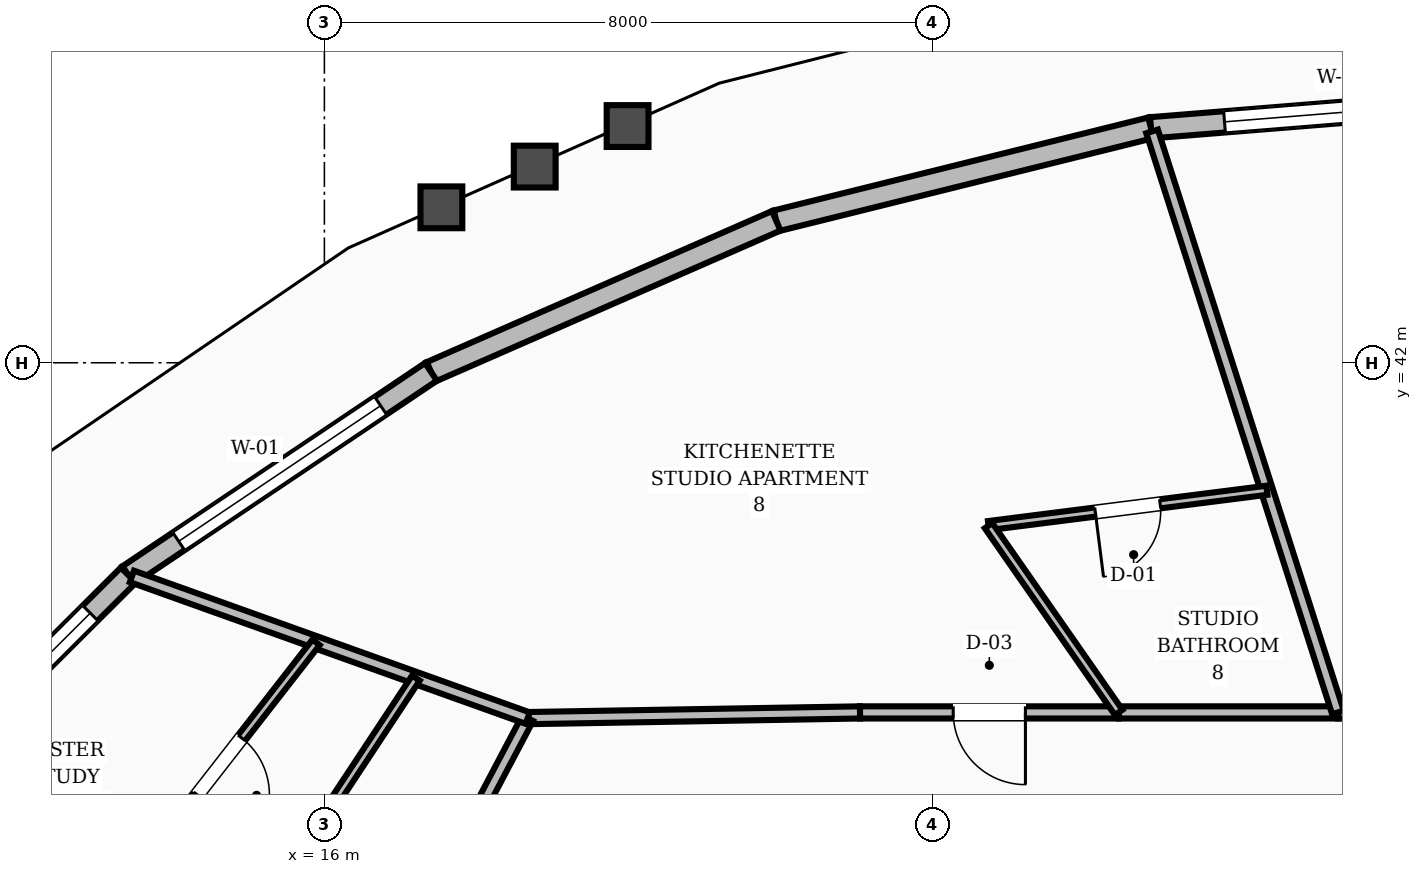
"""IFC4 building model, lengths in metres.
Left out: names, types, materials, properties, quantities, classifications, styles, units other than length and angle.
Written with IfcOpenShell. Run it as: python <this file> out.ifc"""

import sys

from ifc_helpers import new_model, si_unit, direction, frame, frame_2d, origin, place, context, subcontext, project, spatial, rectangle, extrude, element, fill, save


model = new_model("IFC4")
c1 = context("Model", 3, precision=1e-05, world=origin(), true_north=direction((0.0, 1.0)))
c2 = subcontext(c1, "Body", "Model", "MODEL_VIEW")
j1 = project(units=[si_unit("LENGTHUNIT", "METRE"), si_unit("PLANEANGLEUNIT", "RADIAN")], contexts=[c1])
p1 = place(None, origin())
s1 = spatial("IfcSite", under=j1, at=p1, CompositionType="ELEMENT")
p2 = place(p1, origin())
s2 = spatial("IfcBuilding", under=s1, at=p2, CompositionType="ELEMENT")
p3 = place(p2, frame((0.0, 0.0, 156.8)))
s3 = spatial("IfcBuildingStorey", under=s2, at=p3, CompositionType="ELEMENT", Elevation=156.8)
p4 = place(p3, frame((32.0, 45.504, 0.0), z_axis=(0.0, 0.0, 1.0), x_axis=(-0.996768616091, -0.080326371615, 0.0)))
e1 = element("IfcWall", 1, at=p4, inside=s3, PredefinedType="STANDARD", context=c2, shape_type="SweptSolid", body=[
    extrude(rectangle(XDim=5.143, YDim=0.28, at=frame_2d((2.571, 0.0))), origin(), (0.0, 0.0, 1.0), 2.82),
])
p5 = place(p4, frame((0.971, 0.0, 0.8)))
e2 = element("IfcOpeningElement", 2, at=p5, cuts=e1, PredefinedType="OPENING", context=c2, shape_type="SweptSolid", body=[
    extrude(rectangle(XDim=3.2, YDim=1.65, at=frame_2d((1.6, 0.825))), frame((0.0, 0.15, 0.0), z_axis=(0.0, -1.0, 0.0), x_axis=(1.0, 0.0, 0.0)), (0.0, 0.0, 1.0), 0.3),
])
p6 = place(p3, frame((26.874, 45.091, 0.0), z_axis=(0.0, 0.0, 1.0), x_axis=(-0.970528667517, -0.240985695689, 0.0)))
e3 = element("IfcWall", 3, at=p6, inside=s3, PredefinedType="STANDARD", context=c2, shape_type="SweptSolid", body=[
    extrude(rectangle(XDim=5.079, YDim=0.28, at=frame_2d((2.539, 0.0))), origin(), (0.0, 0.0, 1.0), 2.82),
])
p7 = place(p3, frame((21.945, 43.867, 0.0), z_axis=(0.0, 0.0, 1.0), x_axis=(-0.916185584373, -0.400754257603, 0.0)))
e4 = element("IfcWall", 4, at=p7, inside=s3, PredefinedType="STANDARD", context=c2, shape_type="SweptSolid", body=[
    extrude(rectangle(XDim=4.958, YDim=0.28, at=frame_2d((2.479, 0.0))), origin(), (0.0, 0.0, 1.0), 2.82),
])
p8 = place(p3, frame((17.402, 41.88, 0.0), z_axis=(0.0, 0.0, 1.0), x_axis=(-0.830095249601, -0.557621624931, 0.0)))
e5 = element("IfcWall", 5, at=p8, inside=s3, PredefinedType="STANDARD", context=c2, shape_type="SweptSolid", body=[
    extrude(rectangle(XDim=4.796, YDim=0.28, at=frame_2d((2.398, 0.0))), origin(), (0.0, 0.0, 1.0), 2.82),
])
p9 = place(p8, frame((0.798, 0.0, 0.8)))
e6 = element("IfcOpeningElement", 6, at=p9, cuts=e5, PredefinedType="OPENING", context=c2, shape_type="SweptSolid", body=[
    extrude(rectangle(XDim=3.2, YDim=1.65, at=frame_2d((1.6, 0.825))), frame((0.0, 0.15, 0.0), z_axis=(0.0, -1.0, 0.0), x_axis=(1.0, 0.0, 0.0)), (0.0, 0.0, 1.0), 0.3),
])
p10 = place(p3, frame((13.421, 39.206, 0.0), z_axis=(0.0, 0.0, 1.0), x_axis=(-0.708084852303, -0.706127355326, 0.0)))
e7 = element("IfcWall", 7, at=p10, inside=s3, PredefinedType="STANDARD", context=c2, shape_type="SweptSolid", body=[
    extrude(rectangle(XDim=4.615, YDim=0.28, at=frame_2d((2.307, 0.0))), origin(), (0.0, 0.0, 1.0), 2.82),
])
p11 = place(p10, frame((0.708, 0.0, 0.8)))
e8 = element("IfcOpeningElement", 8, at=p11, cuts=e7, PredefinedType="OPENING", context=c2, shape_type="SweptSolid", body=[
    extrude(rectangle(XDim=3.2, YDim=1.65, at=frame_2d((1.6, 0.825))), frame((0.0, 0.15, 0.0), z_axis=(0.0, -1.0, 0.0), x_axis=(1.0, 0.0, 0.0)), (0.0, 0.0, 1.0), 0.3),
])
p12 = place(p3, frame((32.0, 37.4, 0.0), z_axis=(0.0, 0.0, 1.0), x_axis=(-1.0, 0.0, 0.0)))
e9 = element("IfcWall", 9, at=p12, inside=s3, PredefinedType="SOLIDWALL", context=c2, shape_type="SweptSolid", body=[
    extrude(rectangle(XDim=2.665, YDim=0.16, at=frame_2d((1.333, 0.0))), origin(), (0.0, 0.0, 1.0), 2.8),
])
p13 = place(p12, frame((0.858, 0.0, 0.0)))
e10 = element("IfcOpeningElement", 10, at=p13, cuts=e9, PredefinedType="OPENING", context=c2, shape_type="SweptSolid", body=[
    extrude(rectangle(XDim=0.95, YDim=2.1, at=frame_2d((0.475, 1.05))), frame((0.0, 0.09, 0.0), z_axis=(0.0, -1.0, 0.0), x_axis=(1.0, 0.0, 0.0)), (0.0, 0.0, 1.0), 0.18),
])
p14 = place(p3, frame((29.335, 37.4, 0.0), z_axis=(0.0, 0.0, 1.0), x_axis=(-1.0, 0.0, 0.0)))
e11 = element("IfcWall", 11, at=p14, inside=s3, PredefinedType="SOLIDWALL", context=c2, shape_type="SweptSolid", body=[
    extrude(rectangle(XDim=2.885, YDim=0.16, at=frame_2d((1.443, 0.0))), origin(), (0.0, 0.0, 1.0), 2.8),
])
p15 = place(p3, frame((26.449, 37.4, 0.0), z_axis=(0.0, 0.0, 1.0), x_axis=(-1.0, 0.0, 0.0)))
e12 = element("IfcWall", 12, at=p15, inside=s3, PredefinedType="SOLIDWALL", context=c2, shape_type="SweptSolid", body=[
    extrude(rectangle(XDim=3.403, YDim=0.16, at=frame_2d((1.702, 0.0))), origin(), (0.0, 0.0, 1.0), 2.8),
])
p16 = place(p15, frame((1.227, 0.0, 0.0)))
e13 = element("IfcOpeningElement", 13, at=p16, cuts=e12, PredefinedType="OPENING", context=c2, shape_type="SweptSolid", body=[
    extrude(rectangle(XDim=0.95, YDim=2.1, at=frame_2d((0.475, 1.05))), frame((0.0, 0.09, 0.0), z_axis=(0.0, -1.0, 0.0), x_axis=(1.0, 0.0, 0.0)), (0.0, 0.0, 1.0), 0.18),
])
p17 = place(p3, frame((23.046, 37.4, 0.0), z_axis=(0.0, 0.0, 1.0), x_axis=(-0.999853038912, -0.017143528788, 0.0)))
e14 = element("IfcWall", 14, at=p17, inside=s3, PredefinedType="SOLIDWALL", context=c2, shape_type="SweptSolid", body=[
    extrude(rectangle(XDim=4.372, YDim=0.16, at=frame_2d((2.186, 0.0))), origin(), (0.0, 0.0, 1.0), 2.8),
])
p18 = place(p3, frame((18.675, 37.325, 0.0), z_axis=(0.0, 0.0, 1.0), x_axis=(-0.466737093093, -0.884396113702, 0.0)))
e15 = element("IfcWall", 15, at=p18, inside=s3, PredefinedType="SOLIDWALL", context=c2, shape_type="SweptSolid", body=[
    extrude(rectangle(XDim=3.696, YDim=0.16, at=frame_2d((1.848, 0.0))), origin(), (0.0, 0.0, 1.0), 2.8),
])
p19 = place(p3, frame((29.335, 37.4, 0.0), z_axis=(0.0, 0.0, 1.0), x_axis=(-0.304723848151, 0.952440746907, 0.0)))
e16 = element("IfcWall", 16, at=p19, inside=s3, PredefinedType="SOLIDWALL", context=c2, shape_type="SweptSolid", body=[
    extrude(rectangle(XDim=8.025, YDim=0.16, at=frame_2d((4.013, 0.0))), origin(), (0.0, 0.0, 1.0), 2.8),
])
p20 = place(p3, frame((28.4, 40.323, 0.0), z_axis=(0.0, 0.0, 1.0), x_axis=(-0.9920307114, -0.125996300101, 0.0)))
e17 = element("IfcWall", 17, at=p20, inside=s3, PredefinedType="PARTITIONING", context=c2, shape_type="SweptSolid", body=[
    extrude(rectangle(XDim=3.691, YDim=0.12, at=frame_2d((1.846, 0.0))), origin(), (0.0, 0.0, 1.0), 2.8),
])
p21 = place(p20, frame((1.416, 0.0, 0.0)))
e18 = element("IfcOpeningElement", 18, at=p21, cuts=e17, PredefinedType="OPENING", context=c2, shape_type="SweptSolid", body=[
    extrude(rectangle(XDim=0.86, YDim=2.1, at=frame_2d((0.43, 1.05))), frame((0.0, 0.07, 0.0), z_axis=(0.0, -1.0, 0.0), x_axis=(1.0, 0.0, 0.0)), (0.0, 0.0, 1.0), 0.14),
])
p22 = place(p3, frame((26.449, 37.4, 0.0), z_axis=(0.0, 0.0, 1.0), x_axis=(-0.571496694362, 0.820604367728, 0.0)))
e19 = element("IfcWall", 19, at=p22, inside=s3, PredefinedType="PARTITIONING", context=c2, shape_type="SweptSolid", body=[
    extrude(rectangle(XDim=2.995, YDim=0.12, at=frame_2d((1.498, 0.0))), origin(), (0.0, 0.0, 1.0), 2.8),
])
p23 = place(p3, frame((18.675, 37.325, 0.0), z_axis=(0.0, 0.0, 1.0), x_axis=(-0.941491971832, 0.337035409084, 0.0)))
e20 = element("IfcWall", 20, at=p23, inside=s3, PredefinedType="SOLIDWALL", context=c2, shape_type="SweptSolid", body=[
    extrude(rectangle(XDim=5.531, YDim=0.16, at=frame_2d((2.765, 0.0))), origin(), (0.0, 0.0, 1.0), 2.8),
])
p24 = place(p3, frame((17.204, 37.852, 0.0), z_axis=(0.0, 0.0, 1.0), x_axis=(-0.551082022109, -0.834451079997, 0.0)))
e21 = element("IfcWall", 21, at=p24, inside=s3, PredefinedType="PARTITIONING", context=c2, shape_type="SweptSolid", body=[
    extrude(rectangle(XDim=3.914, YDim=0.12, at=frame_2d((1.957, 0.0))), origin(), (0.0, 0.0, 1.0), 2.8),
])
p25 = place(p3, frame((15.89, 38.322, 0.0), z_axis=(0.0, 0.0, 1.0), x_axis=(-0.614589970431, -0.788846733051, 0.0)))
e22 = element("IfcWall", 22, at=p25, inside=s3, PredefinedType="PARTITIONING", context=c2, shape_type="SweptSolid", body=[
    extrude(rectangle(XDim=4.137, YDim=0.12, at=frame_2d((2.069, 0.0))), origin(), (0.0, 0.0, 1.0), 2.8),
])
p26 = place(p25, frame((1.594, 0.0, 0.0)))
e23 = element("IfcOpeningElement", 23, at=p26, cuts=e22, PredefinedType="OPENING", context=c2, shape_type="SweptSolid", body=[
    extrude(rectangle(XDim=0.95, YDim=2.1, at=frame_2d((0.475, 1.05))), frame((0.0, 0.07, 0.0), z_axis=(0.0, -1.0, 0.0), x_axis=(1.0, 0.0, 0.0)), (0.0, 0.0, 1.0), 0.14),
])
p27 = place(p5, origin())
e24 = element("IfcWindow", 24, at=p27, inside=s3, PartitioningType="SINGLE_PANEL", PredefinedType="WINDOW", context=c2, shape_type="SweptSolid", body=[
    extrude(rectangle(XDim=3.2, YDim=1.65, at=frame_2d((1.6, 0.825))), frame((0.0, 0.03, 0.0), z_axis=(0.0, -1.0, 0.0), x_axis=(1.0, 0.0, 0.0)), (0.0, 0.0, 1.0), 0.06),
])
fill(e2, e24)
p28 = place(p9, origin())
e25 = element("IfcWindow", 25, at=p28, inside=s3, PartitioningType="SINGLE_PANEL", PredefinedType="WINDOW", context=c2, shape_type="SweptSolid", body=[
    extrude(rectangle(XDim=3.2, YDim=1.65, at=frame_2d((1.6, 0.825))), frame((0.0, 0.03, 0.0), z_axis=(0.0, -1.0, 0.0), x_axis=(1.0, 0.0, 0.0)), (0.0, 0.0, 1.0), 0.06),
])
fill(e6, e25)
p29 = place(p11, origin())
e26 = element("IfcWindow", 26, at=p29, inside=s3, PartitioningType="SINGLE_PANEL", PredefinedType="WINDOW", context=c2, shape_type="SweptSolid", body=[
    extrude(rectangle(XDim=3.2, YDim=1.65, at=frame_2d((1.6, 0.825))), frame((0.0, 0.03, 0.0), z_axis=(0.0, -1.0, 0.0), x_axis=(1.0, 0.0, 0.0)), (0.0, 0.0, 1.0), 0.06),
])
fill(e8, e26)
p30 = place(p21, origin())
e27 = element("IfcDoor", 27, at=p30, inside=s3, OperationType="SINGLE_SWING_RIGHT", PredefinedType="DOOR", context=c2, shape_type="SweptSolid", body=[
    extrude(rectangle(XDim=0.86, YDim=2.1, at=frame_2d((0.43, 1.05))), frame((0.0, 0.025, 0.0), z_axis=(0.0, -1.0, 0.0), x_axis=(1.0, 0.0, 0.0)), (0.0, 0.0, 1.0), 0.05),
])
fill(e18, e27)
p31 = place(p16, origin())
e28 = element("IfcDoor", 28, at=p31, inside=s3, OperationType="SINGLE_SWING_LEFT", PredefinedType="DOOR", context=c2, shape_type="SweptSolid", body=[
    extrude(rectangle(XDim=0.95, YDim=2.1, at=frame_2d((0.475, 1.05))), frame((0.0, 0.025, 0.0), z_axis=(0.0, -1.0, 0.0), x_axis=(1.0, 0.0, 0.0)), (0.0, 0.0, 1.0), 0.05),
])
fill(e13, e28)
p32 = place(p26, origin())
e29 = element("IfcDoor", 29, at=p32, inside=s3, OperationType="SINGLE_SWING_RIGHT", PredefinedType="DOOR", context=c2, shape_type="SweptSolid", body=[
    extrude(rectangle(XDim=0.95, YDim=2.1, at=frame_2d((0.475, 1.05))), frame((0.0, 0.025, 0.0), z_axis=(0.0, -1.0, 0.0), x_axis=(1.0, 0.0, 0.0)), (0.0, 0.0, 1.0), 0.05),
])
fill(e23, e29)
save(model, sys.argv[1])
